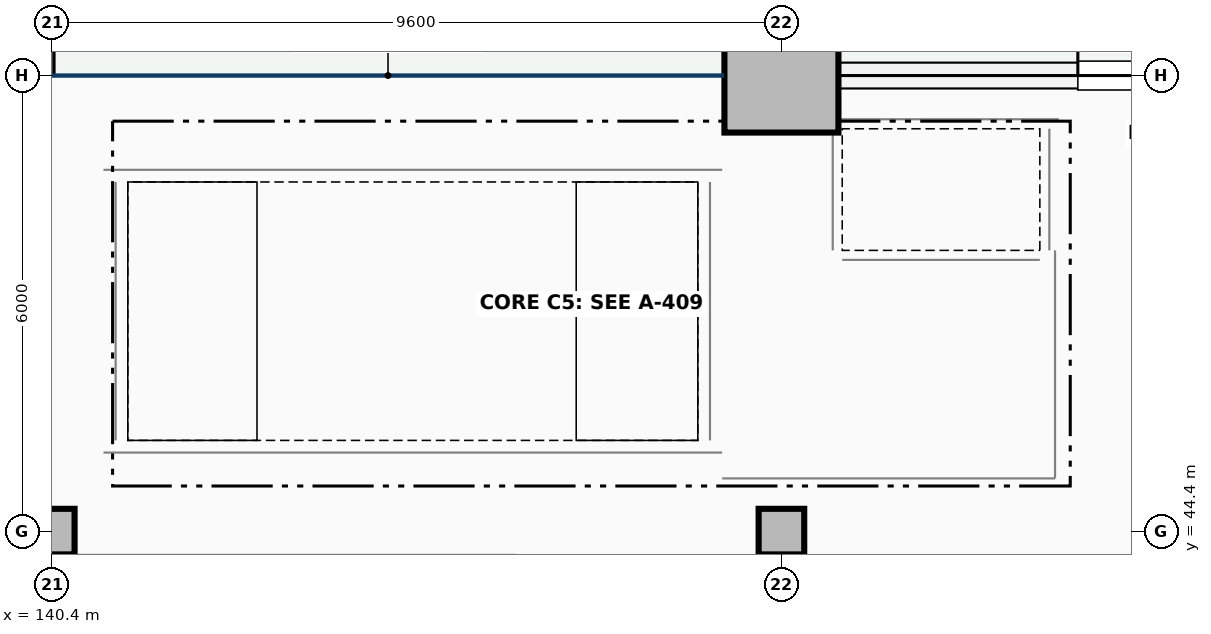
"""IFC4 building model, lengths in metres.
Left out: names, types, materials, properties, quantities, classifications, styles, units other than length and angle.
Written with IfcOpenShell. Run it as: python <this file> out.ifc"""

import sys

from ifc_helpers import new_model, si_unit, direction, frame, frame_2d, origin, origin_2d, place, context, subcontext, project, spatial, rectangle, extrude, element, fill, save


model = new_model("IFC4")
c1 = context("Model", 3, precision=1e-05, world=origin(), true_north=direction((0.0, 1.0)))
c2 = subcontext(c1, "Body", "Model", "MODEL_VIEW")
j1 = project(units=[si_unit("LENGTHUNIT", "METRE"), si_unit("PLANEANGLEUNIT", "RADIAN")], contexts=[c1])
p1 = place(None, origin())
s1 = spatial("IfcSite", under=j1, at=p1, CompositionType="ELEMENT")
p2 = place(p1, origin())
s2 = spatial("IfcBuilding", under=s1, at=p2, CompositionType="ELEMENT")
p3 = place(p2, origin())
s3 = spatial("IfcBuildingStorey", under=s2, at=p3, CompositionType="ELEMENT", Elevation=0.0)
for number, where, z_axis, x_axis in (
    (1, (140.4, 44.4, 0.0), (0.0, 0.0, 1.0), (1.0, 0.0, 0.0)),
    (2, (150.0, 44.4, 0.0), (0.0, 0.0, 1.0), (1.0, 0.0, 0.0)),
):
    element("IfcColumn", number, at=place(p3, frame(where, z_axis=z_axis, x_axis=x_axis)), inside=s3, PredefinedType="COLUMN", context=c2, shape_type="SweptSolid", body=[
        extrude(rectangle(XDim=0.6, YDim=0.6, at=origin_2d()), origin(), (0.0, 0.0, 1.0), 5.1),
    ])
p4 = place(p3, frame((150.0, 50.4, 0.0), z_axis=(0.0, 0.0, 1.0), x_axis=(1.0, 0.0, 0.0)))
e3 = element("IfcColumn", 3, at=p4, inside=s3, PredefinedType="COLUMN", context=c2, shape_type="SweptSolid", body=[
    extrude(rectangle(XDim=1.5, YDim=1.5, at=origin_2d()), origin(), (0.0, 0.0, 1.0), 5.1),
])
p5 = place(p3, frame((150.752, 50.4, 0.0), z_axis=(0.0, 0.0, 1.0), x_axis=(1.0, 0.0, 0.0)))
e4 = element("IfcWall", 4, at=p5, inside=s3, PredefinedType="SOLIDWALL", context=c2, shape_type="SweptSolid", body=[
    extrude(rectangle(XDim=8.096, YDim=0.34, at=frame_2d((4.048, 0.0))), origin(), (0.0, 0.0, 1.0), 4.034),
])
p6 = place(p5, frame((3.148, 0.0, 0.0)))
e5 = element("IfcOpeningElement", 5, at=p6, cuts=e4, PredefinedType="OPENING", context=c2, shape_type="SweptSolid", body=[
    extrude(rectangle(XDim=1.8, YDim=2.3, at=frame_2d((0.9, 1.15))), frame((0.0, 0.18, 0.0), z_axis=(0.0, -1.0, 0.0), x_axis=(1.0, 0.0, 0.0)), (0.0, 0.0, 1.0), 0.36),
])
p7 = place(p3, frame((141.24, 45.6, 0.0), z_axis=(0.0, 0.0, 1.0), x_axis=(0.0, 1.0, 0.0)))
e6 = element("IfcWall", 6, at=p7, inside=s3, PredefinedType="SHEAR", context=c2, shape_type="SweptSolid", body=[
    extrude(rectangle(XDim=3.4, YDim=0.32, at=frame_2d((1.7, 0.0))), origin(), (0.0, 0.0, 1.0), 5.1),
])
for number, where, z_axis, x_axis in (
    (7, (141.08, 45.44, 0.0), (0.0, 0.0, 1.0), (1.0, 0.0, 0.0)),
    (8, (141.08, 49.16, 0.0), (0.0, 0.0, 1.0), (1.0, 0.0, 0.0)),
):
    element("IfcWall", number, at=place(p3, frame(where, z_axis=z_axis, x_axis=x_axis)), inside=s3, PredefinedType="SHEAR", context=c2, shape_type="SweptSolid", body=[
        extrude(rectangle(XDim=8.14, YDim=0.32, at=frame_2d((4.07, 0.0))), origin(), (0.0, 0.0, 1.0), 5.1),
    ])
p8 = place(p3, frame((149.06, 45.6, 0.0), z_axis=(0.0, 0.0, 1.0), x_axis=(0.0, 1.0, 0.0)))
e9 = element("IfcWall", 9, at=p8, inside=s3, PredefinedType="SHEAR", context=c2, shape_type="SweptSolid", body=[
    extrude(rectangle(XDim=3.4, YDim=0.32, at=frame_2d((1.7, 0.0))), origin(), (0.0, 0.0, 1.0), 5.1),
])
p9 = place(p8, frame((0.65, 0.0, 0.0)))
e10 = element("IfcOpeningElement", 10, at=p9, cuts=e9, PredefinedType="OPENING", context=c2, shape_type="SweptSolid", body=[
    extrude(rectangle(XDim=1.2, YDim=2.2, at=frame_2d((0.6, 1.1))), frame((0.0, 0.17, 0.0), z_axis=(0.0, -1.0, 0.0), x_axis=(1.0, 0.0, 0.0)), (0.0, 0.0, 1.0), 0.34),
])
for number, where, z_axis, x_axis in (
    (11, (150.675, 48.1, 0.0), (0.0, 0.0, 1.0), (0.0, 1.0, 0.0)),
    (12, (153.525, 48.1, 0.0), (0.0, 0.0, 1.0), (0.0, 1.0, 0.0)),
):
    element("IfcWall", number, at=place(p3, frame(where, z_axis=z_axis, x_axis=x_axis)), inside=s3, PredefinedType="SHEAR", context=c2, shape_type="SweptSolid", body=[
        extrude(rectangle(XDim=1.6, YDim=0.25, at=frame_2d((0.8, 0.0))), origin(), (0.0, 0.0, 1.0), 5.1),
    ])
p10 = place(p3, frame((150.55, 49.825, 0.0), z_axis=(0.0, 0.0, 1.0), x_axis=(1.0, 0.0, 0.0)))
e13 = element("IfcWall", 13, at=p10, inside=s3, PredefinedType="SHEAR", context=c2, shape_type="SweptSolid", body=[
    extrude(rectangle(XDim=3.1, YDim=0.25, at=frame_2d((1.55, 0.0))), origin(), (0.0, 0.0, 1.0), 5.1),
])
p11 = place(p3, frame((150.8, 47.975, 0.0), z_axis=(0.0, 0.0, 1.0), x_axis=(1.0, 0.0, 0.0)))
e14 = element("IfcWall", 14, at=p11, inside=s3, PredefinedType="SHEAR", context=c2, shape_type="SweptSolid", body=[
    extrude(rectangle(XDim=2.6, YDim=0.25, at=frame_2d((1.3, 0.0))), origin(), (0.0, 0.0, 1.0), 5.1),
])
p12 = place(p11, frame((0.75, 0.0, 0.0)))
e15 = element("IfcOpeningElement", 15, at=p12, cuts=e14, PredefinedType="OPENING", context=c2, shape_type="SweptSolid", body=[
    extrude(rectangle(XDim=1.1, YDim=2.15, at=frame_2d((0.55, 1.075))), frame((0.0, 0.135, 0.0), z_axis=(0.0, -1.0, 0.0), x_axis=(1.0, 0.0, 0.0)), (0.0, 0.0, 1.0), 0.27),
])
p13 = place(p3, frame((153.6, 45.1, 0.0), z_axis=(0.0, 0.0, 1.0), x_axis=(0.0, 1.0, 0.0)))
e16 = element("IfcWall", 16, at=p13, inside=s3, PredefinedType="PARTITIONING", context=c2, shape_type="SweptSolid", body=[
    extrude(rectangle(XDim=3.0, YDim=0.2, at=frame_2d((1.5, 0.0))), origin(), (0.0, 0.0, 1.0), 4.284),
])
p14 = place(p13, frame((0.775, 0.0, 0.0)))
e17 = element("IfcOpeningElement", 17, at=p14, cuts=e16, PredefinedType="OPENING", context=c2, shape_type="SweptSolid", body=[
    extrude(rectangle(XDim=1.45, YDim=2.2, at=frame_2d((0.725, 1.1))), frame((0.0, 0.11, 0.0), z_axis=(0.0, -1.0, 0.0), x_axis=(1.0, 0.0, 0.0)), (0.0, 0.0, 1.0), 0.22),
])
p15 = place(p3, frame((149.22, 45.1, 0.0), z_axis=(0.0, 0.0, 1.0), x_axis=(1.0, 0.0, 0.0)))
e18 = element("IfcWall", 18, at=p15, inside=s3, PredefinedType="PARTITIONING", context=c2, shape_type="SweptSolid", body=[
    extrude(rectangle(XDim=4.38, YDim=0.2, at=frame_2d((2.19, 0.0))), origin(), (0.0, 0.0, 1.0), 4.284),
])
p16 = place(p6, origin())
e19 = element("IfcDoor", 19, at=p16, inside=s3, OperationType="DOUBLE_DOOR_SINGLE_SWING", PredefinedType="DOOR", context=c2, shape_type="SweptSolid", body=[
    extrude(rectangle(XDim=1.8, YDim=2.3, at=frame_2d((0.9, 1.15))), frame((0.0, 0.025, 0.0), z_axis=(0.0, -1.0, 0.0), x_axis=(1.0, 0.0, 0.0)), (0.0, 0.0, 1.0), 0.05),
])
fill(e5, e19)
p17 = place(p9, frame((1.2, 0.0, 0.0), z_axis=(0.0, 0.0, 1.0), x_axis=(-1.0, 0.0, 0.0)))
e20 = element("IfcDoor", 20, at=p17, inside=s3, OperationType="SINGLE_SWING_RIGHT", PredefinedType="DOOR", context=c2, shape_type="SweptSolid", body=[
    extrude(rectangle(XDim=1.2, YDim=2.2, at=frame_2d((0.6, 1.1))), frame((0.0, 0.025, 0.0), z_axis=(0.0, -1.0, 0.0), x_axis=(1.0, 0.0, 0.0)), (0.0, 0.0, 1.0), 0.05),
])
fill(e10, e20)
p18 = place(p12, origin())
e21 = element("IfcDoor", 21, at=p18, inside=s3, OperationType="DOUBLE_DOOR_SLIDING", PredefinedType="DOOR", context=c2, shape_type="SweptSolid", body=[
    extrude(rectangle(XDim=1.1, YDim=2.15, at=frame_2d((0.55, 1.075))), frame((0.0, 0.025, 0.0), z_axis=(0.0, -1.0, 0.0), x_axis=(1.0, 0.0, 0.0)), (0.0, 0.0, 1.0), 0.05),
])
fill(e15, e21)
p19 = place(p14, frame((1.45, 0.0, 0.0), z_axis=(0.0, 0.0, 1.0), x_axis=(-1.0, 0.0, 0.0)))
e22 = element("IfcDoor", 22, at=p19, inside=s3, OperationType="DOUBLE_DOOR_SINGLE_SWING", PredefinedType="DOOR", context=c2, shape_type="SweptSolid", body=[
    extrude(rectangle(XDim=1.45, YDim=2.2, at=frame_2d((0.725, 1.1))), frame((0.0, 0.025, 0.0), z_axis=(0.0, -1.0, 0.0), x_axis=(1.0, 0.0, 0.0)), (0.0, 0.0, 1.0), 0.05),
])
fill(e17, e22)
save(model, sys.argv[1])
